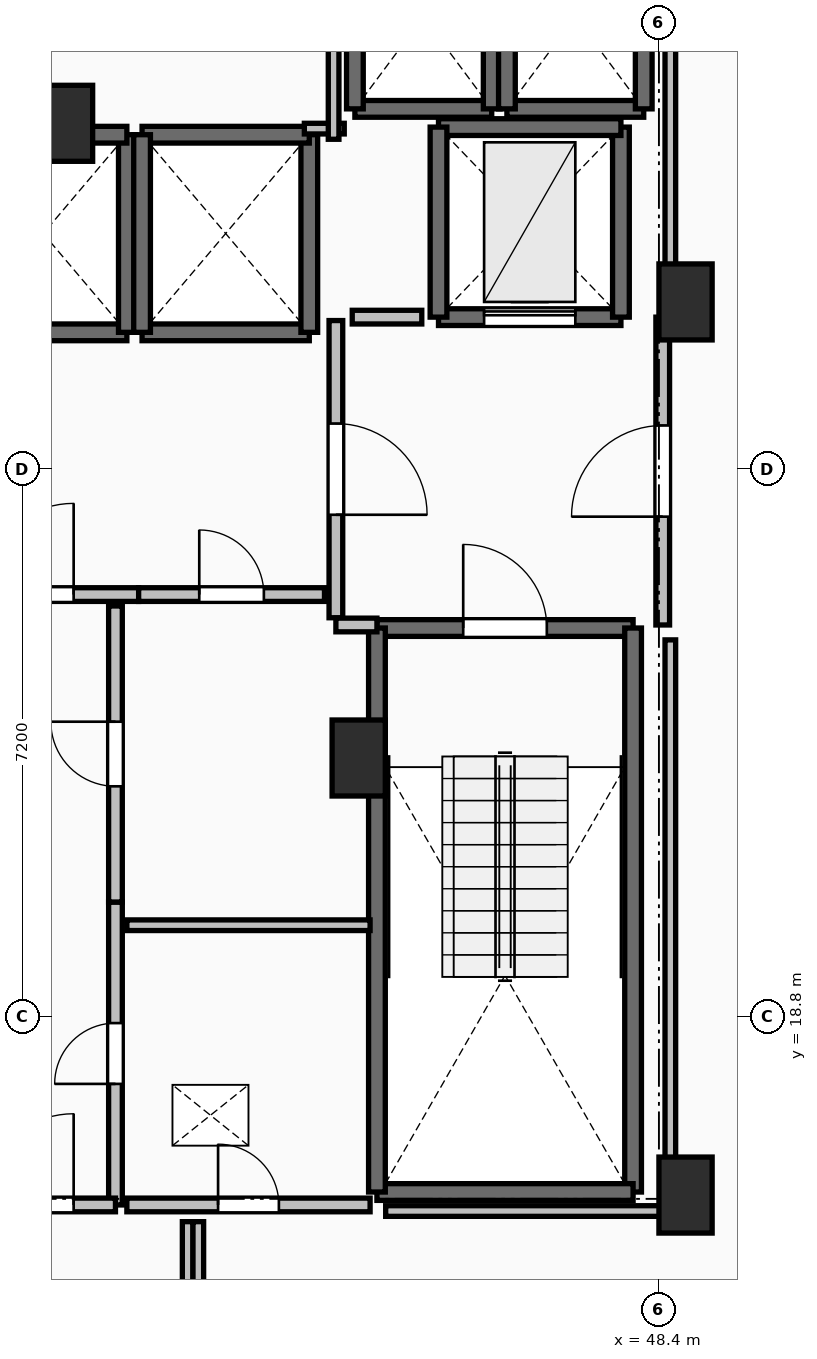
"""IFC4 building model, lengths in metres.
Left out: names, types, materials, properties, quantities, classifications, styles, units other than length and angle.
Written with IfcOpenShell. Run it as: python <this file> out.ifc"""

import sys

from ifc_helpers import new_model, si_unit, direction, frame, frame_2d, origin, origin_2d, place, context, subcontext, project, spatial, rectangle, extrude, element, fill, save


model = new_model("IFC4")
c1 = context("Model", 3, precision=1e-05, world=origin(), true_north=direction((0.0, 1.0)))
c2 = subcontext(c1, "Body", "Model", "MODEL_VIEW")
j1 = project(units=[si_unit("LENGTHUNIT", "METRE"), si_unit("PLANEANGLEUNIT", "RADIAN")], contexts=[c1])
p1 = place(None, origin())
s1 = spatial("IfcSite", under=j1, at=p1, CompositionType="ELEMENT")
p2 = place(p1, origin())
s2 = spatial("IfcBuilding", under=s1, at=p2, CompositionType="ELEMENT")
p3 = place(p2, frame((0.0, 0.0, 221.4)))
s3 = spatial("IfcBuildingStorey", under=s2, at=p3, CompositionType="ELEMENT", Elevation=221.4)
for number, where, z_axis, x_axis in (
    (1, (48.75, 28.2, 0.0), (0.0, 0.0, 1.0), (1.0, 0.0, 0.0)),
    (2, (48.75, 16.45, 0.0), (0.0, 0.0, 1.0), (1.0, 0.0, 0.0)),
    (3, (44.45, 22.2, 0.0), (0.0, 0.0, 1.0), (1.0, 0.0, 0.0)),
    (4, (40.6, 30.55, 0.0), (0.0, 0.0, 1.0), (1.0, 0.0, 0.0)),
):
    element("IfcColumn", number, at=place(p3, frame(where, z_axis=z_axis, x_axis=x_axis)), inside=s3, PredefinedType="PILASTER", context=c2, shape_type="SweptSolid", body=[
        extrude(rectangle(XDim=0.7, YDim=1.0, at=origin_2d()), origin(), (0.0, 0.0, 1.0), 3.55),
    ])
p4 = place(p3, frame((44.69, 23.91, 0.0), z_axis=(0.0, 0.0, 1.0), x_axis=(1.0, 0.0, 0.0)))
e5 = element("IfcWall", 5, at=p4, inside=s3, PredefinedType="SOLIDWALL", context=c2, shape_type="SweptSolid", body=[
    extrude(rectangle(XDim=3.37, YDim=0.22, at=frame_2d((1.685, 0.0))), origin(), (0.0, 0.0, 1.0), 3.2),
])
p5 = place(p4, frame((1.135, 0.0, 0.0)))
e6 = element("IfcOpeningElement", 6, at=p5, cuts=e5, PredefinedType="OPENING", context=c2, shape_type="SweptSolid", body=[
    extrude(rectangle(XDim=1.1, YDim=2.15, at=frame_2d((0.55, 1.075))), frame((0.0, 0.125, 0.0), z_axis=(0.0, -1.0, 0.0), x_axis=(1.0, 0.0, 0.0)), (0.0, 0.0, 1.0), 0.25),
])
p6 = place(p3, frame((48.06, 23.91, 0.0), z_axis=(0.0, 0.0, 1.0), x_axis=(0.0, -1.0, 0.0)))
e7 = element("IfcWall", 7, at=p6, inside=s3, PredefinedType="SOLIDWALL", context=c2, shape_type="SweptSolid", body=[
    extrude(rectangle(XDim=7.42, YDim=0.22, at=frame_2d((3.71, 0.0))), origin(), (0.0, 0.0, 1.0), 3.2),
])
p7 = place(p3, frame((48.06, 16.49, 0.0), z_axis=(0.0, 0.0, 1.0), x_axis=(-1.0, 0.0, 0.0)))
e8 = element("IfcWall", 8, at=p7, inside=s3, PredefinedType="SOLIDWALL", context=c2, shape_type="SweptSolid", body=[
    extrude(rectangle(XDim=3.37, YDim=0.22, at=frame_2d((1.685, 0.0))), origin(), (0.0, 0.0, 1.0), 3.2),
])
p8 = place(p3, frame((44.69, 16.49, 0.0), z_axis=(0.0, 0.0, 1.0), x_axis=(0.0, 1.0, 0.0)))
e9 = element("IfcWall", 9, at=p8, inside=s3, PredefinedType="SOLIDWALL", context=c2, shape_type="SweptSolid", body=[
    extrude(rectangle(XDim=7.42, YDim=0.22, at=frame_2d((3.71, 0.0))), origin(), (0.0, 0.0, 1.0), 3.2),
])
p9 = place(p3, frame((39.2, 27.8, 0.0), z_axis=(0.0, 0.0, 1.0), x_axis=(1.0, 0.0, 0.0)))
e10 = element("IfcWall", 10, at=p9, inside=s3, PredefinedType="SOLIDWALL", context=c2, shape_type="SweptSolid", body=[
    extrude(rectangle(XDim=2.2, YDim=0.22, at=frame_2d((1.1, 0.0))), origin(), (0.0, 0.0, 1.0), 3.2),
])
p10 = place(p3, frame((41.4, 27.8, 0.0), z_axis=(0.0, 0.0, 1.0), x_axis=(0.0, 1.0, 0.0)))
e11 = element("IfcWall", 11, at=p10, inside=s3, PredefinedType="SOLIDWALL", context=c2, shape_type="SweptSolid", body=[
    extrude(rectangle(XDim=2.6, YDim=0.22, at=frame_2d((1.3, 0.0))), origin(), (0.0, 0.0, 1.0), 3.2),
])
for number, where, z_axis, x_axis in (
    (12, (41.4, 30.4, 0.0), (0.0, 0.0, 1.0), (-1.0, 0.0, 0.0)),
    (13, (41.6, 27.8, 0.0), (0.0, 0.0, 1.0), (1.0, 0.0, 0.0)),
):
    element("IfcWall", number, at=place(p3, frame(where, z_axis=z_axis, x_axis=x_axis)), inside=s3, PredefinedType="SOLIDWALL", context=c2, shape_type="SweptSolid", body=[
        extrude(rectangle(XDim=2.2, YDim=0.22, at=frame_2d((1.1, 0.0))), origin(), (0.0, 0.0, 1.0), 3.2),
    ])
p11 = place(p3, frame((43.8, 27.8, 0.0), z_axis=(0.0, 0.0, 1.0), x_axis=(0.0, 1.0, 0.0)))
e14 = element("IfcWall", 14, at=p11, inside=s3, PredefinedType="SOLIDWALL", context=c2, shape_type="SweptSolid", body=[
    extrude(rectangle(XDim=2.6, YDim=0.22, at=frame_2d((1.3, 0.0))), origin(), (0.0, 0.0, 1.0), 3.2),
])
p12 = place(p3, frame((43.8, 30.4, 0.0), z_axis=(0.0, 0.0, 1.0), x_axis=(-1.0, 0.0, 0.0)))
e15 = element("IfcWall", 15, at=p12, inside=s3, PredefinedType="SOLIDWALL", context=c2, shape_type="SweptSolid", body=[
    extrude(rectangle(XDim=2.2, YDim=0.22, at=frame_2d((1.1, 0.0))), origin(), (0.0, 0.0, 1.0), 3.2),
])
p13 = place(p3, frame((41.6, 30.4, 0.0), z_axis=(0.0, 0.0, 1.0), x_axis=(0.0, -1.0, 0.0)))
e16 = element("IfcWall", 16, at=p13, inside=s3, PredefinedType="SOLIDWALL", context=c2, shape_type="SweptSolid", body=[
    extrude(rectangle(XDim=2.6, YDim=0.22, at=frame_2d((1.3, 0.0))), origin(), (0.0, 0.0, 1.0), 3.2),
])
p14 = place(p3, frame((44.4, 30.74, 0.0), z_axis=(0.0, 0.0, 1.0), x_axis=(1.0, 0.0, 0.0)))
e17 = element("IfcWall", 17, at=p14, inside=s3, PredefinedType="SOLIDWALL", context=c2, shape_type="SweptSolid", body=[
    extrude(rectangle(XDim=1.8, YDim=0.22, at=frame_2d((0.9, 0.0))), origin(), (0.0, 0.0, 1.0), 3.2),
])
for number, where, z_axis, x_axis in (
    (18, (46.2, 30.74, 0.0), (0.0, 0.0, 1.0), (0.0, 1.0, 0.0)),
    (19, (44.4, 33.16, 0.0), (0.0, 0.0, 1.0), (0.0, -1.0, 0.0)),
):
    element("IfcWall", number, at=place(p3, frame(where, z_axis=z_axis, x_axis=x_axis)), inside=s3, PredefinedType="SOLIDWALL", context=c2, shape_type="SweptSolid", body=[
        extrude(rectangle(XDim=2.42, YDim=0.22, at=frame_2d((1.21, 0.0))), origin(), (0.0, 0.0, 1.0), 3.2),
    ])
p15 = place(p3, frame((46.4, 30.74, 0.0), z_axis=(0.0, 0.0, 1.0), x_axis=(1.0, 0.0, 0.0)))
e20 = element("IfcWall", 20, at=p15, inside=s3, PredefinedType="SOLIDWALL", context=c2, shape_type="SweptSolid", body=[
    extrude(rectangle(XDim=1.8, YDim=0.22, at=frame_2d((0.9, 0.0))), origin(), (0.0, 0.0, 1.0), 3.2),
])
for number, where, z_axis, x_axis in (
    (21, (48.2, 30.74, 0.0), (0.0, 0.0, 1.0), (0.0, 1.0, 0.0)),
    (22, (46.4, 33.16, 0.0), (0.0, 0.0, 1.0), (0.0, -1.0, 0.0)),
):
    element("IfcWall", number, at=place(p3, frame(where, z_axis=z_axis, x_axis=x_axis)), inside=s3, PredefinedType="SOLIDWALL", context=c2, shape_type="SweptSolid", body=[
        extrude(rectangle(XDim=2.42, YDim=0.22, at=frame_2d((1.21, 0.0))), origin(), (0.0, 0.0, 1.0), 3.2),
    ])
p16 = place(p3, frame((45.5, 28.0, 0.0), z_axis=(0.0, 0.0, 1.0), x_axis=(1.0, 0.0, 0.0)))
e23 = element("IfcWall", 23, at=p16, inside=s3, PredefinedType="SHEAR", context=c2, shape_type="SweptSolid", body=[
    extrude(rectangle(XDim=2.4, YDim=0.22, at=frame_2d((1.2, 0.0))), origin(), (0.0, 0.0, 1.0), 3.2),
])
p17 = place(p16, frame((0.6, 0.0, 0.0)))
e24 = element("IfcOpeningElement", 24, at=p17, cuts=e23, PredefinedType="OPENING", context=c2, shape_type="SweptSolid", body=[
    extrude(rectangle(XDim=1.2, YDim=2.2, at=frame_2d((0.6, 1.1))), frame((0.0, 0.125, 0.0), z_axis=(0.0, -1.0, 0.0), x_axis=(1.0, 0.0, 0.0)), (0.0, 0.0, 1.0), 0.25),
])
p18 = place(p3, frame((47.9, 28.0, 0.0), z_axis=(0.0, 0.0, 1.0), x_axis=(0.0, 1.0, 0.0)))
e25 = element("IfcWall", 25, at=p18, inside=s3, PredefinedType="SHEAR", context=c2, shape_type="SweptSolid", body=[
    extrude(rectangle(XDim=2.5, YDim=0.22, at=frame_2d((1.25, 0.0))), origin(), (0.0, 0.0, 1.0), 3.2),
])
p19 = place(p3, frame((47.9, 30.5, 0.0), z_axis=(0.0, 0.0, 1.0), x_axis=(-1.0, 0.0, 0.0)))
e26 = element("IfcWall", 26, at=p19, inside=s3, PredefinedType="SHEAR", context=c2, shape_type="SweptSolid", body=[
    extrude(rectangle(XDim=2.4, YDim=0.22, at=frame_2d((1.2, 0.0))), origin(), (0.0, 0.0, 1.0), 3.2),
])
p20 = place(p3, frame((45.5, 30.5, 0.0), z_axis=(0.0, 0.0, 1.0), x_axis=(0.0, -1.0, 0.0)))
e27 = element("IfcWall", 27, at=p20, inside=s3, PredefinedType="SHEAR", context=c2, shape_type="SweptSolid", body=[
    extrude(rectangle(XDim=2.5, YDim=0.22, at=frame_2d((1.25, 0.0))), origin(), (0.0, 0.0, 1.0), 3.2),
])
p21 = place(p3, frame((44.15, 27.955, 0.0), z_axis=(0.0, 0.0, 1.0), x_axis=(0.0, -1.0, 0.0)))
e28 = element("IfcWall", 28, at=p21, inside=s3, PredefinedType="PARTITIONING", context=c2, shape_type="SweptSolid", body=[
    extrude(rectangle(XDim=3.91, YDim=0.18, at=frame_2d((1.955, 0.0))), origin(), (0.0, 0.0, 1.0), 3.2),
])
p22 = place(p21, frame((1.355, 0.0, 0.0)))
e29 = element("IfcOpeningElement", 29, at=p22, cuts=e28, PredefinedType="OPENING", context=c2, shape_type="SweptSolid", body=[
    extrude(rectangle(XDim=1.2, YDim=2.15, at=frame_2d((0.6, 1.075))), frame((0.0, 0.105, 0.0), z_axis=(0.0, -1.0, 0.0), x_axis=(1.0, 0.0, 0.0)), (0.0, 0.0, 1.0), 0.21),
])
p23 = place(p3, frame((44.15, 23.95, 0.0), z_axis=(0.0, 0.0, 1.0), x_axis=(1.0, 0.0, 0.0)))
e30 = element("IfcWall", 30, at=p23, inside=s3, PredefinedType="PARTITIONING", context=c2, shape_type="SweptSolid", body=[
    extrude(rectangle(XDim=0.54, YDim=0.18, at=frame_2d((0.27, 0.0))), origin(), (0.0, 0.0, 1.0), 3.2),
])
p24 = place(p3, frame((48.45, 23.95, 0.0), z_axis=(0.0, 0.0, 1.0), x_axis=(0.0, 1.0, 0.0)))
e31 = element("IfcWall", 31, at=p24, inside=s3, PredefinedType="PARTITIONING", context=c2, shape_type="SweptSolid", body=[
    extrude(rectangle(XDim=4.05, YDim=0.18, at=frame_2d((2.025, 0.0))), origin(), (0.0, 0.0, 1.0), 3.2),
])
p25 = place(p24, frame((1.425, 0.0, 0.0)))
e32 = element("IfcOpeningElement", 32, at=p25, cuts=e31, PredefinedType="OPENING", context=c2, shape_type="SweptSolid", body=[
    extrude(rectangle(XDim=1.2, YDim=2.15, at=frame_2d((0.6, 1.075))), frame((0.0, 0.105, 0.0), z_axis=(0.0, -1.0, 0.0), x_axis=(1.0, 0.0, 0.0)), (0.0, 0.0, 1.0), 0.21),
])
p26 = place(p3, frame((38.645, 24.35, 0.0), z_axis=(0.0, 0.0, 1.0), x_axis=(1.0, 0.0, 0.0)))
e33 = element("IfcWall", 33, at=p26, inside=s3, PredefinedType="PARTITIONING", context=c2, shape_type="SweptSolid", body=[
    extrude(rectangle(XDim=2.91, YDim=0.18, at=frame_2d((1.455, 0.0))), origin(), (0.0, 0.0, 1.0), 3.2),
])
p27 = place(p26, frame((0.855, 0.0, 0.0)))
e34 = element("IfcOpeningElement", 34, at=p27, cuts=e33, PredefinedType="OPENING", context=c2, shape_type="SweptSolid", body=[
    extrude(rectangle(XDim=1.2, YDim=2.15, at=frame_2d((0.6, 1.075))), frame((0.0, 0.105, 0.0), z_axis=(0.0, -1.0, 0.0), x_axis=(1.0, 0.0, 0.0)), (0.0, 0.0, 1.0), 0.21),
])
p28 = place(p3, frame((41.555, 24.35, 0.0), z_axis=(0.0, 0.0, 1.0), x_axis=(1.0, 0.0, 0.0)))
e35 = element("IfcWall", 35, at=p28, inside=s3, PredefinedType="PARTITIONING", context=c2, shape_type="SweptSolid", body=[
    extrude(rectangle(XDim=2.445, YDim=0.18, at=frame_2d((1.223, 0.0))), origin(), (0.0, 0.0, 1.0), 3.2),
])
p29 = place(p28, frame((0.798, 0.0, 0.0)))
e36 = element("IfcOpeningElement", 36, at=p29, cuts=e35, PredefinedType="OPENING", context=c2, shape_type="SweptSolid", body=[
    extrude(rectangle(XDim=0.85, YDim=2.1, at=frame_2d((0.425, 1.05))), frame((0.0, 0.105, 0.0), z_axis=(0.0, -1.0, 0.0), x_axis=(1.0, 0.0, 0.0)), (0.0, 0.0, 1.0), 0.21),
])
p30 = place(p3, frame((41.25, 16.32, 0.0), z_axis=(0.0, 0.0, 1.0), x_axis=(0.0, 1.0, 0.0)))
e37 = element("IfcWall", 37, at=p30, inside=s3, PredefinedType="PARTITIONING", context=c2, shape_type="SweptSolid", body=[
    extrude(rectangle(XDim=3.985, YDim=0.18, at=frame_2d((1.992, 0.0))), origin(), (0.0, 0.0, 1.0), 3.2),
])
p31 = place(p30, frame((1.593, 0.0, 0.0)))
e38 = element("IfcOpeningElement", 38, at=p31, cuts=e37, PredefinedType="OPENING", context=c2, shape_type="SweptSolid", body=[
    extrude(rectangle(XDim=0.8, YDim=2.05, at=frame_2d((0.4, 1.025))), frame((0.0, 0.105, 0.0), z_axis=(0.0, -1.0, 0.0), x_axis=(1.0, 0.0, 0.0)), (0.0, 0.0, 1.0), 0.21),
])
p32 = place(p3, frame((41.25, 20.305, 0.0), z_axis=(0.0, 0.0, 1.0), x_axis=(0.0, 1.0, 0.0)))
e39 = element("IfcWall", 39, at=p32, inside=s3, PredefinedType="PARTITIONING", context=c2, shape_type="SweptSolid", body=[
    extrude(rectangle(XDim=3.895, YDim=0.18, at=frame_2d((1.948, 0.0))), origin(), (0.0, 0.0, 1.0), 3.2),
])
p33 = place(p32, frame((1.522, 0.0, 0.0)))
e40 = element("IfcOpeningElement", 40, at=p33, cuts=e39, PredefinedType="OPENING", context=c2, shape_type="SweptSolid", body=[
    extrude(rectangle(XDim=0.85, YDim=2.1, at=frame_2d((0.425, 1.05))), frame((0.0, 0.105, 0.0), z_axis=(0.0, -1.0, 0.0), x_axis=(1.0, 0.0, 0.0)), (0.0, 0.0, 1.0), 0.21),
])
p34 = place(p3, frame((38.95, 16.32, 0.0), z_axis=(0.0, 0.0, 1.0), x_axis=(1.0, 0.0, 0.0)))
e41 = element("IfcWall", 41, at=p34, inside=s3, PredefinedType="PARTITIONING", context=c2, shape_type="SweptSolid", body=[
    extrude(rectangle(XDim=2.3, YDim=0.18, at=frame_2d((1.15, 0.0))), origin(), (0.0, 0.0, 1.0), 3.2),
])
p35 = place(p34, frame((0.55, 0.0, 0.0)))
e42 = element("IfcOpeningElement", 42, at=p35, cuts=e41, PredefinedType="OPENING", context=c2, shape_type="SweptSolid", body=[
    extrude(rectangle(XDim=1.2, YDim=2.15, at=frame_2d((0.6, 1.075))), frame((0.0, 0.105, 0.0), z_axis=(0.0, -1.0, 0.0), x_axis=(1.0, 0.0, 0.0)), (0.0, 0.0, 1.0), 0.21),
])
p36 = place(p3, frame((44.6, 20.0, 0.0), z_axis=(0.0, 0.0, 1.0), x_axis=(-1.0, 0.0, 0.0)))
e43 = element("IfcWall", 43, at=p36, inside=s3, PredefinedType="PARTITIONING", context=c2, shape_type="SweptSolid", body=[
    extrude(rectangle(XDim=3.2, YDim=0.14, at=frame_2d((1.6, 0.0))), origin(), (0.0, 0.0, 1.0), 3.2),
])
p37 = place(p3, frame((41.4, 16.32, 0.0), z_axis=(0.0, 0.0, 1.0), x_axis=(1.0, 0.0, 0.0)))
e44 = element("IfcWall", 44, at=p37, inside=s3, PredefinedType="PARTITIONING", context=c2, shape_type="SweptSolid", body=[
    extrude(rectangle(XDim=3.2, YDim=0.18, at=frame_2d((1.6, 0.0))), origin(), (0.0, 0.0, 1.0), 3.2),
])
p38 = place(p37, frame((1.2, 0.0, 0.0)))
e45 = element("IfcOpeningElement", 45, at=p38, cuts=e44, PredefinedType="OPENING", context=c2, shape_type="SweptSolid", body=[
    extrude(rectangle(XDim=0.8, YDim=2.05, at=frame_2d((0.4, 1.025))), frame((0.0, 0.105, 0.0), z_axis=(0.0, -1.0, 0.0), x_axis=(1.0, 0.0, 0.0)), (0.0, 0.0, 1.0), 0.21),
])
p39 = place(p3, frame((45.28, 28.0, 0.0), z_axis=(0.0, 0.0, 1.0), x_axis=(-1.0, 0.0, 0.0)))
e46 = element("IfcWall", 46, at=p39, inside=s3, PredefinedType="PARTITIONING", context=c2, shape_type="SweptSolid", body=[
    extrude(rectangle(XDim=0.915, YDim=0.18, at=frame_2d((0.458, 0.0))), origin(), (0.0, 0.0, 1.0), 3.2),
])
p40 = place(p3, frame((43.735, 30.48, 0.0), z_axis=(0.0, 0.0, 1.0), x_axis=(1.0, 0.0, 0.0)))
e47 = element("IfcWall", 47, at=p40, inside=s3, PredefinedType="PARTITIONING", context=c2, shape_type="SweptSolid", body=[
    extrude(rectangle(XDim=0.525, YDim=0.14, at=frame_2d((0.262, 0.0))), origin(), (0.0, 0.0, 1.0), 3.2),
])
p41 = place(p3, frame((44.12, 30.34, 0.0), z_axis=(0.0, 0.0, 1.0), x_axis=(0.0, 1.0, 0.0)))
e48 = element("IfcWall", 48, at=p41, inside=s3, PredefinedType="PARTITIONING", context=c2, shape_type="SweptSolid", body=[
    extrude(rectangle(XDim=2.66, YDim=0.14, at=frame_2d((1.33, 0.0))), origin(), (0.0, 0.0, 1.0), 3.2),
])
p42 = place(p3, frame((48.55, 16.24, 0.0), z_axis=(0.0, 0.0, 1.0), x_axis=(0.0, 1.0, 0.0)))
e49 = element("IfcWall", 49, at=p42, inside=s3, PredefinedType="PARTITIONING", context=c2, shape_type="SweptSolid", body=[
    extrude(rectangle(XDim=7.514, YDim=0.14, at=frame_2d((3.757, 0.0))), origin(), (0.0, 0.0, 1.0), 2.392),
])
p43 = place(p3, frame((48.55, 28.196, 0.0), z_axis=(0.0, 0.0, 1.0), x_axis=(0.0, 1.0, 0.0)))
e50 = element("IfcWall", 50, at=p43, inside=s3, PredefinedType="PARTITIONING", context=c2, shape_type="SweptSolid", body=[
    extrude(rectangle(XDim=5.254, YDim=0.14, at=frame_2d((2.627, 0.0))), origin(), (0.0, 0.0, 1.0), 2.392),
])
for number, where, z_axis, x_axis in (
    (51, (42.2, 16.1, 0.0), (0.0, 0.0, 1.0), (0.0, -1.0, 0.0)),
    (52, (42.34, 14.27, 0.0), (0.0, 0.0, 1.0), (0.0, 1.0, 0.0)),
):
    element("IfcWall", number, at=place(p3, frame(where, z_axis=z_axis, x_axis=x_axis)), inside=s3, PredefinedType="PARTITIONING", context=c2, shape_type="SweptSolid", body=[
        extrude(rectangle(XDim=1.83, YDim=0.14, at=frame_2d((0.915, 0.0))), origin(), (0.0, 0.0, 1.0), 3.2),
    ])
p44 = place(p3, frame((44.805, 16.24, 0.0), z_axis=(0.0, 0.0, 1.0), x_axis=(1.0, 0.0, 0.0)))
e53 = element("IfcWall", 53, at=p44, inside=s3, PredefinedType="PARTITIONING", context=c2, shape_type="SweptSolid", body=[
    extrude(rectangle(XDim=3.745, YDim=0.14, at=frame_2d((1.873, 0.0))), origin(), (0.0, 0.0, 1.0), 2.392),
])
p45 = place(p5, origin())
e54 = element("IfcDoor", 54, at=p45, inside=s3, OperationType="SINGLE_SWING_LEFT", PredefinedType="DOOR", context=c2, shape_type="SweptSolid", body=[
    extrude(rectangle(XDim=1.1, YDim=2.15, at=frame_2d((0.55, 1.075))), frame((0.0, 0.025, 0.0), z_axis=(0.0, -1.0, 0.0), x_axis=(1.0, 0.0, 0.0)), (0.0, 0.0, 1.0), 0.05),
])
fill(e6, e54)
p46 = place(p17, origin())
e55 = element("IfcDoor", 55, at=p46, inside=s3, OperationType="SLIDING_TO_LEFT", PredefinedType="DOOR", context=c2, shape_type="SweptSolid", body=[
    extrude(rectangle(XDim=1.2, YDim=2.2, at=frame_2d((0.6, 1.1))), frame((0.0, 0.025, 0.0), z_axis=(0.0, -1.0, 0.0), x_axis=(1.0, 0.0, 0.0)), (0.0, 0.0, 1.0), 0.05),
])
fill(e24, e55)
p47 = place(p22, origin())
e56 = element("IfcDoor", 56, at=p47, inside=s3, OperationType="SINGLE_SWING_RIGHT", PredefinedType="DOOR", context=c2, shape_type="SweptSolid", body=[
    extrude(rectangle(XDim=1.2, YDim=2.15, at=frame_2d((0.6, 1.075))), frame((0.0, 0.025, 0.0), z_axis=(0.0, -1.0, 0.0), x_axis=(1.0, 0.0, 0.0)), (0.0, 0.0, 1.0), 0.05),
])
fill(e29, e56)
p48 = place(p25, origin())
e57 = element("IfcDoor", 57, at=p48, inside=s3, OperationType="SINGLE_SWING_LEFT", PredefinedType="DOOR", context=c2, shape_type="SweptSolid", body=[
    extrude(rectangle(XDim=1.2, YDim=2.15, at=frame_2d((0.6, 1.075))), frame((0.0, 0.025, 0.0), z_axis=(0.0, -1.0, 0.0), x_axis=(1.0, 0.0, 0.0)), (0.0, 0.0, 1.0), 0.05),
])
fill(e32, e57)
p49 = place(p27, origin())
e58 = element("IfcDoor", 58, at=p49, inside=s3, OperationType="SINGLE_SWING_RIGHT", PredefinedType="DOOR", context=c2, shape_type="SweptSolid", body=[
    extrude(rectangle(XDim=1.2, YDim=2.15, at=frame_2d((0.6, 1.075))), frame((0.0, 0.025, 0.0), z_axis=(0.0, -1.0, 0.0), x_axis=(1.0, 0.0, 0.0)), (0.0, 0.0, 1.0), 0.05),
])
fill(e34, e58)
p50 = place(p29, origin())
e59 = element("IfcDoor", 59, at=p50, inside=s3, OperationType="SINGLE_SWING_LEFT", PredefinedType="DOOR", context=c2, shape_type="SweptSolid", body=[
    extrude(rectangle(XDim=0.85, YDim=2.1, at=frame_2d((0.425, 1.05))), frame((0.0, 0.025, 0.0), z_axis=(0.0, -1.0, 0.0), x_axis=(1.0, 0.0, 0.0)), (0.0, 0.0, 1.0), 0.05),
])
fill(e36, e59)
p51 = place(p31, origin())
e60 = element("IfcDoor", 60, at=p51, inside=s3, OperationType="SINGLE_SWING_LEFT", PredefinedType="DOOR", context=c2, shape_type="SweptSolid", body=[
    extrude(rectangle(XDim=0.8, YDim=2.05, at=frame_2d((0.4, 1.025))), frame((0.0, 0.025, 0.0), z_axis=(0.0, -1.0, 0.0), x_axis=(1.0, 0.0, 0.0)), (0.0, 0.0, 1.0), 0.05),
])
fill(e38, e60)
p52 = place(p33, origin())
e61 = element("IfcDoor", 61, at=p52, inside=s3, OperationType="SINGLE_SWING_RIGHT", PredefinedType="DOOR", context=c2, shape_type="SweptSolid", body=[
    extrude(rectangle(XDim=0.85, YDim=2.1, at=frame_2d((0.425, 1.05))), frame((0.0, 0.025, 0.0), z_axis=(0.0, -1.0, 0.0), x_axis=(1.0, 0.0, 0.0)), (0.0, 0.0, 1.0), 0.05),
])
fill(e40, e61)
p53 = place(p35, origin())
e62 = element("IfcDoor", 62, at=p53, inside=s3, OperationType="SINGLE_SWING_RIGHT", PredefinedType="DOOR", context=c2, shape_type="SweptSolid", body=[
    extrude(rectangle(XDim=1.2, YDim=2.15, at=frame_2d((0.6, 1.075))), frame((0.0, 0.025, 0.0), z_axis=(0.0, -1.0, 0.0), x_axis=(1.0, 0.0, 0.0)), (0.0, 0.0, 1.0), 0.05),
])
fill(e42, e62)
p54 = place(p38, origin())
e63 = element("IfcDoor", 63, at=p54, inside=s3, OperationType="SINGLE_SWING_LEFT", PredefinedType="DOOR", context=c2, shape_type="SweptSolid", body=[
    extrude(rectangle(XDim=0.8, YDim=2.05, at=frame_2d((0.4, 1.025))), frame((0.0, 0.025, 0.0), z_axis=(0.0, -1.0, 0.0), x_axis=(1.0, 0.0, 0.0)), (0.0, 0.0, 1.0), 0.05),
])
fill(e45, e63)
save(model, sys.argv[1])
